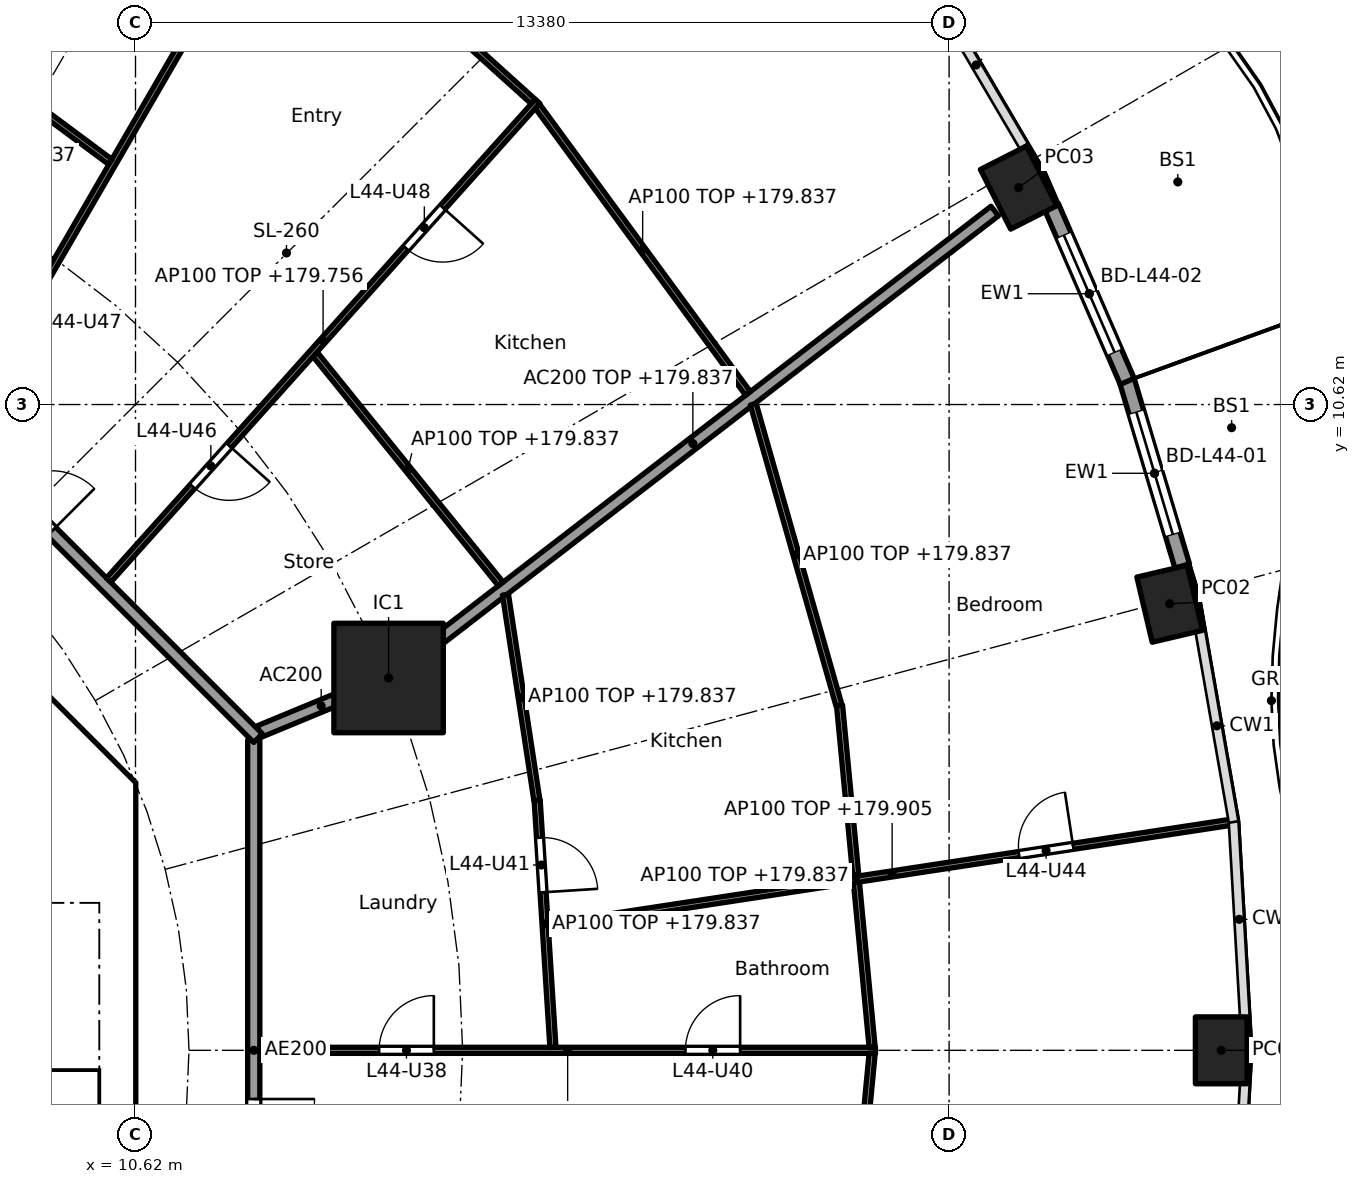
"""IFC4 building model, lengths in metres.
Left out: names, types, materials, properties, quantities, classifications, styles, units other than length and angle.
Written with IfcOpenShell. Run it as: python <this file> out.ifc"""

import sys

from ifc_helpers import new_model, si_unit, direction, frame, frame_2d, origin, origin_2d, place, context, subcontext, project, spatial, polyline, rectangle, hollow_rectangle, outline, extrude, element, fill, save


model = new_model("IFC4")
c1 = context("Model", 3, precision=1e-05, world=origin(), true_north=direction((0.0, 1.0)))
c2 = subcontext(c1, "Body", "Model", "MODEL_VIEW")
j1 = project(units=[si_unit("LENGTHUNIT", "METRE"), si_unit("PLANEANGLEUNIT", "RADIAN")], contexts=[c1])
p1 = place(None, origin())
s1 = spatial("IfcSite", under=j1, at=p1, CompositionType="ELEMENT")
p2 = place(p1, origin())
s2 = spatial("IfcBuilding", under=s1, at=p2, CompositionType="ELEMENT")
p3 = place(p2, frame((0.0, 0.0, 177.0)))
s3 = spatial("IfcBuildingStorey", under=s2, at=p3, CompositionType="ELEMENT", Elevation=177.0)
for number, where, z_axis, x_axis in (
    (1, (28.475, 0.0, 0.0), (0.0, 0.0, 1.0), (0.0, 1.0, 0.0)),
    (2, (27.627, 7.344, 0.0), (0.0, 0.0, 1.0), (-0.229, 0.973, 0.0)),
    (3, (25.142, 14.188, 0.0), (0.0, 0.0, 1.0), (-0.452, 0.892, 0.0)),
):
    element("IfcColumn", number, at=place(p3, frame(where, z_axis=z_axis, x_axis=x_axis)), inside=s3, PredefinedType="COLUMN", context=c2, shape_type="SweptSolid", body=[
        extrude(hollow_rectangle(XDim=1.1, YDim=0.85, WallThickness=0.036, at=origin_2d()), origin(), (0.0, 0.0, 1.0), 3.7),
    ])
p4 = place(p3, frame((14.782, 6.123, 0.0), z_axis=(0.0, 0.0, 1.0), x_axis=(1.0, 0.0, 0.0)))
e4 = element("IfcColumn", 4, at=p4, inside=s3, PredefinedType="COLUMN", context=c2, shape_type="SweptSolid", body=[
    extrude(rectangle(XDim=1.8, YDim=1.8, at=origin_2d()), origin(), (0.0, 0.0, 1.0), 3.7),
])
p5 = place(p3, frame((26.924, 11.014, 0.0), z_axis=(0.0, 0.0, 1.0), x_axis=(0.28584838049, -0.958274857946, 0.0)))
e5 = element("IfcWall", 5, at=p5, inside=s3, PredefinedType="SOLIDWALL", context=c2, shape_type="SweptSolid", body=[
    extrude(rectangle(XDim=3.182, YDim=0.25, at=frame_2d((1.591, 0.0))), origin(), (0.0, 0.0, 1.0), 3.44),
])
p6 = place(p5, frame((0.541, 0.0, 0.0)))
e6 = element("IfcOpeningElement", 6, at=p6, cuts=e5, PredefinedType="OPENING", context=c2, shape_type="SweptSolid", body=[
    extrude(rectangle(XDim=2.1, YDim=2.4, at=frame_2d((1.05, 1.2))), frame((0.0, 0.135, 0.0), z_axis=(0.0, -1.0, 0.0), x_axis=(1.0, 0.0, 0.0)), (0.0, 0.0, 1.0), 0.27),
])
p7 = place(p3, frame((25.679, 13.883, 0.0), z_axis=(0.0, 0.0, 1.0), x_axis=(0.397620521824, -0.917549955384, 0.0)))
e7 = element("IfcWall", 7, at=p7, inside=s3, PredefinedType="SOLIDWALL", context=c2, shape_type="SweptSolid", body=[
    extrude(rectangle(XDim=3.142, YDim=0.25, at=frame_2d((1.571, 0.0))), origin(), (0.0, 0.0, 1.0), 3.44),
])
p8 = place(p7, frame((0.521, 0.0, 0.0)))
e8 = element("IfcOpeningElement", 8, at=p8, cuts=e7, PredefinedType="OPENING", context=c2, shape_type="SweptSolid", body=[
    extrude(rectangle(XDim=2.1, YDim=2.4, at=frame_2d((1.05, 1.2))), frame((0.0, 0.135, 0.0), z_axis=(0.0, -1.0, 0.0), x_axis=(1.0, 0.0, 0.0)), (0.0, 0.0, 1.0), 0.27),
])
p9 = place(p3, frame((9.988, 4.613, 0.0), z_axis=(0.0, 0.0, 1.0), x_axis=(-0.707106781187, 0.707106781187, 0.0)))
e9 = element("IfcWall", 9, at=p9, inside=s3, PredefinedType="SHEAR", context=c2, shape_type="SweptSolid", body=[
    extrude(rectangle(XDim=7.602, YDim=0.6, at=frame_2d((3.801, 0.0))), origin(), (0.0, 0.0, 1.0), 3.44),
])
p10 = place(p9, frame((3.201, 0.0, 0.0)))
e10 = element("IfcOpeningElement", 10, at=p10, cuts=e9, PredefinedType="OPENING", context=c2, shape_type="SweptSolid", body=[
    extrude(rectangle(XDim=1.2, YDim=2.1, at=frame_2d((0.6, 1.05))), frame((0.0, 0.31, 0.0), z_axis=(0.0, -1.0, 0.0), x_axis=(1.0, 0.0, 0.0)), (0.0, 0.0, 1.0), 0.62),
])
p11 = place(p3, frame((6.7, 4.0, 0.0), z_axis=(0.0, 0.0, 1.0), x_axis=(1.0, 0.0, 0.0)))
e11 = element("IfcWall", 11, at=p11, inside=s3, PredefinedType="SOLIDWALL", context=c2, shape_type="SweptSolid", body=[
    extrude(rectangle(XDim=3.325, YDim=0.2, at=frame_2d((1.662, 0.0))), origin(), (0.0, 0.0, 1.0), 3.44),
])
p12 = place(p11, frame((1.25, 0.0, 0.0)))
e12 = element("IfcOpeningElement", 12, at=p12, cuts=e11, PredefinedType="OPENING", context=c2, shape_type="SweptSolid", body=[
    extrude(rectangle(XDim=1.1, YDim=2.1, at=frame_2d((0.55, 1.05))), frame((0.0, 0.11, 0.0), z_axis=(0.0, -1.0, 0.0), x_axis=(1.0, 0.0, 0.0)), (0.0, 0.0, 1.0), 0.22),
])
p13 = place(p3, origin())
e13 = element("IfcWall", 13, at=p13, inside=s3, PredefinedType="SHEAR", context=c2, shape_type="SweptSolid", body=[
    extrude(outline(polyline([(9.776, -4.401), (10.025, -4.152), (10.025, -3.801), (10.025, 4.152), (9.776, 4.401), (10.2, 4.825), (10.625, 4.401), (10.625, -4.401), (10.2, -4.825), (9.776, -4.401)])), origin(), (0.0, 0.0, 1.0), 3.44),
])
p14 = place(p3, frame((12.657, 5.243, 0.0), z_axis=(0.0, 0.0, 1.0), x_axis=(0.92383017907, 0.382802560388, 0.0)))
e14 = element("IfcWall", 14, at=p14, inside=s3, PredefinedType="PARTITIONING", context=c2, shape_type="SweptSolid", body=[
    extrude(rectangle(XDim=2.2, YDim=0.2, at=frame_2d((1.1, 0.0))), origin(), (0.0, 0.0, 1.0), 3.44),
])
p15 = place(p3, frame((14.822, 6.154, 0.0), z_axis=(0.0, 0.0, 1.0), x_axis=(0.792203056092, 0.610257583254, 0.0)))
e15 = element("IfcWall", 15, at=p15, inside=s3, PredefinedType="PARTITIONING", context=c2, shape_type="SweptSolid", body=[
    extrude(rectangle(XDim=12.533, YDim=0.2, at=frame_2d((6.266, 0.0))), origin(), (0.0, 0.0, 1.0), 2.837),
])
p16 = place(p3, frame((6.138, 14.83, 0.0), z_axis=(0.0, 0.0, 1.0), x_axis=(0.294818517221, 0.955553264818, 0.0)))
e16 = element("IfcWall", 16, at=p16, inside=s3, PredefinedType="PARTITIONING", context=c2, shape_type="SweptSolid", body=[
    extrude(rectangle(XDim=12.619, YDim=0.2, at=frame_2d((6.31, 0.0))), origin(), (0.0, 0.0, 1.0), 2.837),
])
p17 = place(p3, frame((12.565, -5.104, 0.0), z_axis=(0.0, 0.0, 1.0), x_axis=(0.0, 1.0, 0.0)))
e17 = element("IfcWall", 17, at=p17, inside=s3, PredefinedType="PARTITIONING", context=c2, shape_type="SweptSolid", body=[
    extrude(rectangle(XDim=10.209, YDim=0.2, at=frame_2d((5.104, 0.0))), origin(), (0.0, 0.0, 1.0), 3.44),
])
p18 = place(p17, frame((3.303, 0.0, 0.0)))
e18 = element("IfcOpeningElement", 18, at=p18, cuts=e17, PredefinedType="OPENING", context=c2, shape_type="SweptSolid", body=[
    extrude(rectangle(XDim=1.0, YDim=2.1, at=frame_2d((0.5, 1.05))), frame((0.0, 0.11, 0.0), z_axis=(0.0, -1.0, 0.0), x_axis=(1.0, 0.0, 0.0)), (0.0, 0.0, 1.0), 0.22),
])
p19 = place(p3, frame((12.635, 5.134, 0.0), z_axis=(0.0, 0.0, 1.0), x_axis=(-0.707106781187, 0.707106781187, 0.0)))
e19 = element("IfcWall", 19, at=p19, inside=s3, PredefinedType="PARTITIONING", context=c2, shape_type="SweptSolid", body=[
    extrude(rectangle(XDim=10.609, YDim=0.2, at=frame_2d((5.305, 0.0))), origin(), (0.0, 0.0, 1.0), 3.44),
])
p20 = place(p19, frame((4.804, 0.0, 0.0)))
e20 = element("IfcOpeningElement", 20, at=p20, cuts=e19, PredefinedType="OPENING", context=c2, shape_type="SweptSolid", body=[
    extrude(rectangle(XDim=1.0, YDim=2.1, at=frame_2d((0.5, 1.05))), frame((0.0, 0.11, 0.0), z_axis=(0.0, -1.0, 0.0), x_axis=(1.0, 0.0, 0.0)), (0.0, 0.0, 1.0), 0.22),
])
p21 = place(p3, frame((12.665, 0.0, 0.0), z_axis=(0.0, 0.0, 1.0), x_axis=(1.0, 0.0, 0.0)))
e21 = element("IfcWall", 21, at=p21, inside=s3, PredefinedType="PARTITIONING", context=c2, shape_type="SweptSolid", body=[
    extrude(rectangle(XDim=10.124, YDim=0.1, at=frame_2d((5.062, 0.0))), origin(), (0.0, 0.0, 1.0), 2.756),
])
p22 = place(p21, frame((1.961, 0.0, 0.0)))
e22 = element("IfcOpeningElement", 22, at=p22, cuts=e21, PredefinedType="OPENING", context=c2, shape_type="SweptSolid", body=[
    extrude(rectangle(XDim=0.9, YDim=2.1, at=frame_2d((0.45, 1.05))), frame((0.0, 0.06, 0.0), z_axis=(0.0, -1.0, 0.0), x_axis=(1.0, 0.0, 0.0)), (0.0, 0.0, 1.0), 0.12),
])
p23 = place(p21, frame((6.999, 0.0, 0.0)))
e23 = element("IfcOpeningElement", 23, at=p23, cuts=e21, PredefinedType="OPENING", context=c2, shape_type="SweptSolid", body=[
    extrude(rectangle(XDim=0.9, YDim=2.1, at=frame_2d((0.45, 1.05))), frame((0.0, 0.06, 0.0), z_axis=(0.0, -1.0, 0.0), x_axis=(1.0, 0.0, 0.0)), (0.0, 0.0, 1.0), 0.12),
])
p24 = place(p3, frame((17.485, 0.05, 0.0), z_axis=(0.0, 0.0, 1.0), x_axis=(-0.063673473968, 0.997970785501, 0.0)))
e24 = element("IfcWall", 24, at=p24, inside=s3, PredefinedType="PARTITIONING", context=c2, shape_type="SweptSolid", body=[
    extrude(rectangle(XDim=4.072, YDim=0.1, at=frame_2d((2.036, 0.0))), origin(), (0.0, 0.0, 1.0), 2.837),
])
p25 = place(p24, frame((2.554, 0.0, 0.0)))
e25 = element("IfcOpeningElement", 25, at=p25, cuts=e24, PredefinedType="OPENING", context=c2, shape_type="SweptSolid", body=[
    extrude(rectangle(XDim=0.9, YDim=2.1, at=frame_2d((0.45, 1.05))), frame((0.0, 0.06, 0.0), z_axis=(0.0, -1.0, 0.0), x_axis=(1.0, 0.0, 0.0)), (0.0, 0.0, 1.0), 0.12),
])
p26 = place(p3, frame((22.734, 0.05, 0.0), z_axis=(0.0, 0.0, 1.0), x_axis=(-0.0949274088, 0.995484197292, 0.0)))
e26 = element("IfcWall", 26, at=p26, inside=s3, PredefinedType="PARTITIONING", context=c2, shape_type="SweptSolid", body=[
    extrude(rectangle(XDim=5.648, YDim=0.1, at=frame_2d((2.824, 0.0))), origin(), (0.0, 0.0, 1.0), 2.837),
])
p27 = place(p3, frame((22.734, -0.05, 0.0), z_axis=(0.0, 0.0, 1.0), x_axis=(-0.094923312677, -0.995484587882, 0.0)))
e27 = element("IfcWall", 27, at=p27, inside=s3, PredefinedType="PARTITIONING", context=c2, shape_type="SweptSolid", body=[
    extrude(rectangle(XDim=5.548, YDim=0.1, at=frame_2d((2.774, 0.0))), origin(), (0.0, 0.0, 1.0), 2.837),
])
p28 = place(p27, frame((2.324, 0.0, 0.0)))
e28 = element("IfcOpeningElement", 28, at=p28, cuts=e27, PredefinedType="OPENING", context=c2, shape_type="SweptSolid", body=[
    extrude(rectangle(XDim=0.9, YDim=2.1, at=frame_2d((0.45, 1.05))), frame((0.0, 0.06, 0.0), z_axis=(0.0, -1.0, 0.0), x_axis=(1.0, 0.0, 0.0)), (0.0, 0.0, 1.0), 0.12),
])
p29 = place(p3, frame((17.407, 2.039, 0.0), z_axis=(0.0, 0.0, 1.0), x_axis=(0.98858728603, 0.150649188184, 0.0)))
e29 = element("IfcWall", 29, at=p29, inside=s3, PredefinedType="PARTITIONING", context=c2, shape_type="SweptSolid", body=[
    extrude(rectangle(XDim=11.441, YDim=0.1, at=frame_2d((5.721, 0.0))), origin(), (0.0, 0.0, 1.0), 2.905),
])
p30 = place(p29, frame((7.832, 0.0, 0.0)))
e30 = element("IfcOpeningElement", 30, at=p30, cuts=e29, PredefinedType="OPENING", context=c2, shape_type="SweptSolid", body=[
    extrude(rectangle(XDim=0.9, YDim=2.1, at=frame_2d((0.45, 1.05))), frame((0.0, 0.06, 0.0), z_axis=(0.0, -1.0, 0.0), x_axis=(1.0, 0.0, 0.0)), (0.0, 0.0, 1.0), 0.12),
])
p31 = place(p3, frame((17.221, 4.113, 0.0), z_axis=(0.0, 0.0, 1.0), x_axis=(-0.1510806336, 0.988521442434, 0.0)))
e31 = element("IfcWall", 31, at=p31, inside=s3, PredefinedType="PARTITIONING", context=c2, shape_type="SweptSolid", body=[
    extrude(rectangle(XDim=3.419, YDim=0.1, at=frame_2d((1.71, 0.0))), origin(), (0.0, 0.0, 1.0), 2.837),
])
p32 = place(p3, frame((22.189, 5.67, 0.0), z_axis=(0.0, 0.0, 1.0), x_axis=(-0.273819702124, 0.961781040949, 0.0)))
e32 = element("IfcWall", 32, at=p32, inside=s3, PredefinedType="PARTITIONING", context=c2, shape_type="SweptSolid", body=[
    extrude(rectangle(XDim=5.152, YDim=0.1, at=frame_2d((2.576, 0.0))), origin(), (0.0, 0.0, 1.0), 2.837),
])
p33 = place(p3, frame((16.626, 7.67, 0.0), z_axis=(0.0, 0.0, 1.0), x_axis=(-0.628738316533, 0.777616955399, 0.0)))
e33 = element("IfcWall", 33, at=p33, inside=s3, PredefinedType="PARTITIONING", context=c2, shape_type="SweptSolid", body=[
    extrude(rectangle(XDim=4.857, YDim=0.1, at=frame_2d((2.429, 0.0))), origin(), (0.0, 0.0, 1.0), 2.837),
])
p34 = place(p3, frame((20.692, 10.802, 0.0), z_axis=(0.0, 0.0, 1.0), x_axis=(-0.591110768293, 0.806590391468, 0.0)))
e34 = element("IfcWall", 34, at=p34, inside=s3, PredefinedType="PARTITIONING", context=c2, shape_type="SweptSolid", body=[
    extrude(rectangle(XDim=5.86, YDim=0.1, at=frame_2d((2.93, 0.0))), origin(), (0.0, 0.0, 1.0), 2.837),
])
p35 = place(p3, frame((10.178, 7.732, 0.0), z_axis=(0.0, 0.0, 1.0), x_axis=(0.667280084362, 0.744806880348, 0.0)))
e35 = element("IfcWall", 35, at=p35, inside=s3, PredefinedType="PARTITIONING", context=c2, shape_type="SweptSolid", body=[
    extrude(rectangle(XDim=10.572, YDim=0.1, at=frame_2d((5.286, 0.0))), origin(), (0.0, 0.0, 1.0), 2.756),
])
p36 = place(p35, frame((2.07, 0.0, 0.0)))
e36 = element("IfcOpeningElement", 36, at=p36, cuts=e35, PredefinedType="OPENING", context=c2, shape_type="SweptSolid", body=[
    extrude(rectangle(XDim=0.9, YDim=2.1, at=frame_2d((0.45, 1.05))), frame((0.0, 0.06, 0.0), z_axis=(0.0, -1.0, 0.0), x_axis=(1.0, 0.0, 0.0)), (0.0, 0.0, 1.0), 0.12),
])
p37 = place(p35, frame((7.331, 0.0, 0.0)))
e37 = element("IfcOpeningElement", 37, at=p37, cuts=e35, PredefinedType="OPENING", context=c2, shape_type="SweptSolid", body=[
    extrude(rectangle(XDim=0.9, YDim=2.1, at=frame_2d((0.45, 1.05))), frame((0.0, 0.06, 0.0), z_axis=(0.0, -1.0, 0.0), x_axis=(1.0, 0.0, 0.0)), (0.0, 0.0, 1.0), 0.12),
])
p38 = place(p3, frame((17.162, 15.603, 0.0), z_axis=(0.0, 0.0, 1.0), x_axis=(-0.742790086539, 0.66952437397, 0.0)))
e38 = element("IfcWall", 38, at=p38, inside=s3, PredefinedType="PARTITIONING", context=c2, shape_type="SweptSolid", body=[
    extrude(rectangle(XDim=5.542, YDim=0.1, at=frame_2d((2.771, 0.0))), origin(), (0.0, 0.0, 1.0), 2.837),
])
p39 = place(p38, frame((2.321, 0.0, 0.0)))
e39 = element("IfcOpeningElement", 39, at=p39, cuts=e38, PredefinedType="OPENING", context=c2, shape_type="SweptSolid", body=[
    extrude(rectangle(XDim=0.9, YDim=2.1, at=frame_2d((0.45, 1.05))), frame((0.0, 0.06, 0.0), z_axis=(0.0, -1.0, 0.0), x_axis=(1.0, 0.0, 0.0)), (0.0, 0.0, 1.0), 0.12),
])
p40 = place(p3, frame((7.708, 10.198, 0.0), z_axis=(0.0, 0.0, 1.0), x_axis=(0.501305229744, 0.865270516446, 0.0)))
e40 = element("IfcWall", 40, at=p40, inside=s3, PredefinedType="PARTITIONING", context=c2, shape_type="SweptSolid", body=[
    extrude(rectangle(XDim=16.064, YDim=0.1, at=frame_2d((8.032, 0.0))), origin(), (0.0, 0.0, 1.0), 2.756),
])
p41 = place(p40, frame((2.082, 0.0, 0.0)))
e41 = element("IfcOpeningElement", 41, at=p41, cuts=e40, PredefinedType="OPENING", context=c2, shape_type="SweptSolid", body=[
    extrude(rectangle(XDim=0.9, YDim=2.1, at=frame_2d((0.45, 1.05))), frame((0.0, 0.06, 0.0), z_axis=(0.0, -1.0, 0.0), x_axis=(1.0, 0.0, 0.0)), (0.0, 0.0, 1.0), 0.12),
])
p42 = place(p40, frame((7.369, 0.0, 0.0)))
e42 = element("IfcOpeningElement", 42, at=p42, cuts=e40, PredefinedType="OPENING", context=c2, shape_type="SweptSolid", body=[
    extrude(rectangle(XDim=0.9, YDim=2.1, at=frame_2d((0.45, 1.05))), frame((0.0, 0.06, 0.0), z_axis=(0.0, -1.0, 0.0), x_axis=(1.0, 0.0, 0.0)), (0.0, 0.0, 1.0), 0.12),
])
p43 = place(p40, frame((12.869, 0.0, 0.0)))
e43 = element("IfcOpeningElement", 43, at=p43, cuts=e40, PredefinedType="OPENING", context=c2, shape_type="SweptSolid", body=[
    extrude(rectangle(XDim=0.9, YDim=2.1, at=frame_2d((0.45, 1.05))), frame((0.0, 0.06, 0.0), z_axis=(0.0, -1.0, 0.0), x_axis=(1.0, 0.0, 0.0)), (0.0, 0.0, 1.0), 0.12),
])
p44 = place(p3, frame((10.207, 14.61, 0.0), z_axis=(0.0, 0.0, 1.0), x_axis=(-0.802769141821, 0.596289950394, 0.0)))
e44 = element("IfcWall", 44, at=p44, inside=s3, PredefinedType="PARTITIONING", context=c2, shape_type="SweptSolid", body=[
    extrude(rectangle(XDim=4.092, YDim=0.1, at=frame_2d((2.046, 0.0))), origin(), (0.0, 0.0, 1.0), 2.837),
])
p45 = place(p3, frame((8.564, 15.89, 0.0), z_axis=(0.0, 0.0, 1.0), x_axis=(0.404011266873, 0.914754008595, 0.0)))
e45 = element("IfcWall", 45, at=p45, inside=s3, PredefinedType="PARTITIONING", context=c2, shape_type="SweptSolid", body=[
    extrude(rectangle(XDim=5.199, YDim=0.1, at=frame_2d((2.6, 0.0))), origin(), (0.0, 0.0, 1.0), 3.44),
])
p46 = place(p6, origin())
e46 = element("IfcDoor", 46, at=p46, inside=s3, OperationType="SLIDING_TO_LEFT", PredefinedType="DOOR", context=c2, shape_type="SweptSolid", body=[
    extrude(rectangle(XDim=2.1, YDim=2.4, at=frame_2d((1.05, 1.2))), frame((0.0, 0.025, 0.0), z_axis=(0.0, -1.0, 0.0), x_axis=(1.0, 0.0, 0.0)), (0.0, 0.0, 1.0), 0.05),
])
fill(e6, e46)
p47 = place(p8, origin())
e47 = element("IfcDoor", 47, at=p47, inside=s3, OperationType="SLIDING_TO_LEFT", PredefinedType="DOOR", context=c2, shape_type="SweptSolid", body=[
    extrude(rectangle(XDim=2.1, YDim=2.4, at=frame_2d((1.05, 1.2))), frame((0.0, 0.025, 0.0), z_axis=(0.0, -1.0, 0.0), x_axis=(1.0, 0.0, 0.0)), (0.0, 0.0, 1.0), 0.05),
])
fill(e8, e47)
p48 = place(p18, frame((1.0, 0.0, 0.0), x_axis=(-1.0, 0.0, 0.0)))
e48 = element("IfcDoor", 48, at=p48, inside=s3, OperationType="SINGLE_SWING_LEFT", PredefinedType="DOOR", context=c2, shape_type="SweptSolid", body=[
    extrude(rectangle(XDim=1.0, YDim=2.1, at=frame_2d((0.5, 1.05))), frame((0.0, 0.025, 0.0), z_axis=(0.0, -1.0, 0.0), x_axis=(1.0, 0.0, 0.0)), (0.0, 0.0, 1.0), 0.05),
])
fill(e18, e48)
p49 = place(p22, origin())
e49 = element("IfcDoor", 49, at=p49, inside=s3, OperationType="SINGLE_SWING_RIGHT", PredefinedType="DOOR", context=c2, shape_type="SweptSolid", body=[
    extrude(rectangle(XDim=0.9, YDim=2.1, at=frame_2d((0.45, 1.05))), frame((0.0, 0.025, 0.0), z_axis=(0.0, -1.0, 0.0), x_axis=(1.0, 0.0, 0.0)), (0.0, 0.0, 1.0), 0.05),
])
fill(e22, e49)
p50 = place(p23, origin())
e50 = element("IfcDoor", 50, at=p50, inside=s3, OperationType="SINGLE_SWING_RIGHT", PredefinedType="DOOR", context=c2, shape_type="SweptSolid", body=[
    extrude(rectangle(XDim=0.9, YDim=2.1, at=frame_2d((0.45, 1.05))), frame((0.0, 0.025, 0.0), z_axis=(0.0, -1.0, 0.0), x_axis=(1.0, 0.0, 0.0)), (0.0, 0.0, 1.0), 0.05),
])
fill(e23, e50)
p51 = place(p25, frame((0.9, 0.0, 0.0), x_axis=(-1.0, 0.0, 0.0)))
e51 = element("IfcDoor", 51, at=p51, inside=s3, OperationType="SINGLE_SWING_RIGHT", PredefinedType="DOOR", context=c2, shape_type="SweptSolid", body=[
    extrude(rectangle(XDim=0.9, YDim=2.1, at=frame_2d((0.45, 1.05))), frame((0.0, 0.025, 0.0), z_axis=(0.0, -1.0, 0.0), x_axis=(1.0, 0.0, 0.0)), (0.0, 0.0, 1.0), 0.05),
])
fill(e25, e51)
p52 = place(p30, origin())
e52 = element("IfcDoor", 52, at=p52, inside=s3, OperationType="SINGLE_SWING_RIGHT", PredefinedType="DOOR", context=c2, shape_type="SweptSolid", body=[
    extrude(rectangle(XDim=0.9, YDim=2.1, at=frame_2d((0.45, 1.05))), frame((0.0, 0.025, 0.0), z_axis=(0.0, -1.0, 0.0), x_axis=(1.0, 0.0, 0.0)), (0.0, 0.0, 1.0), 0.05),
])
fill(e30, e52)
p53 = place(p20, frame((1.0, 0.0, 0.0), x_axis=(-1.0, 0.0, 0.0)))
e53 = element("IfcDoor", 53, at=p53, inside=s3, OperationType="SINGLE_SWING_RIGHT", PredefinedType="DOOR", context=c2, shape_type="SweptSolid", body=[
    extrude(rectangle(XDim=1.0, YDim=2.1, at=frame_2d((0.5, 1.05))), frame((0.0, 0.025, 0.0), z_axis=(0.0, -1.0, 0.0), x_axis=(1.0, 0.0, 0.0)), (0.0, 0.0, 1.0), 0.05),
])
fill(e20, e53)
p54 = place(p36, frame((0.9, 0.0, 0.0), x_axis=(-1.0, 0.0, 0.0)))
e54 = element("IfcDoor", 54, at=p54, inside=s3, OperationType="SINGLE_SWING_LEFT", PredefinedType="DOOR", context=c2, shape_type="SweptSolid", body=[
    extrude(rectangle(XDim=0.9, YDim=2.1, at=frame_2d((0.45, 1.05))), frame((0.0, 0.025, 0.0), z_axis=(0.0, -1.0, 0.0), x_axis=(1.0, 0.0, 0.0)), (0.0, 0.0, 1.0), 0.05),
])
fill(e36, e54)
p55 = place(p37, frame((0.9, 0.0, 0.0), x_axis=(-1.0, 0.0, 0.0)))
e55 = element("IfcDoor", 55, at=p55, inside=s3, OperationType="SINGLE_SWING_LEFT", PredefinedType="DOOR", context=c2, shape_type="SweptSolid", body=[
    extrude(rectangle(XDim=0.9, YDim=2.1, at=frame_2d((0.45, 1.05))), frame((0.0, 0.025, 0.0), z_axis=(0.0, -1.0, 0.0), x_axis=(1.0, 0.0, 0.0)), (0.0, 0.0, 1.0), 0.05),
])
fill(e37, e55)
save(model, sys.argv[1])
